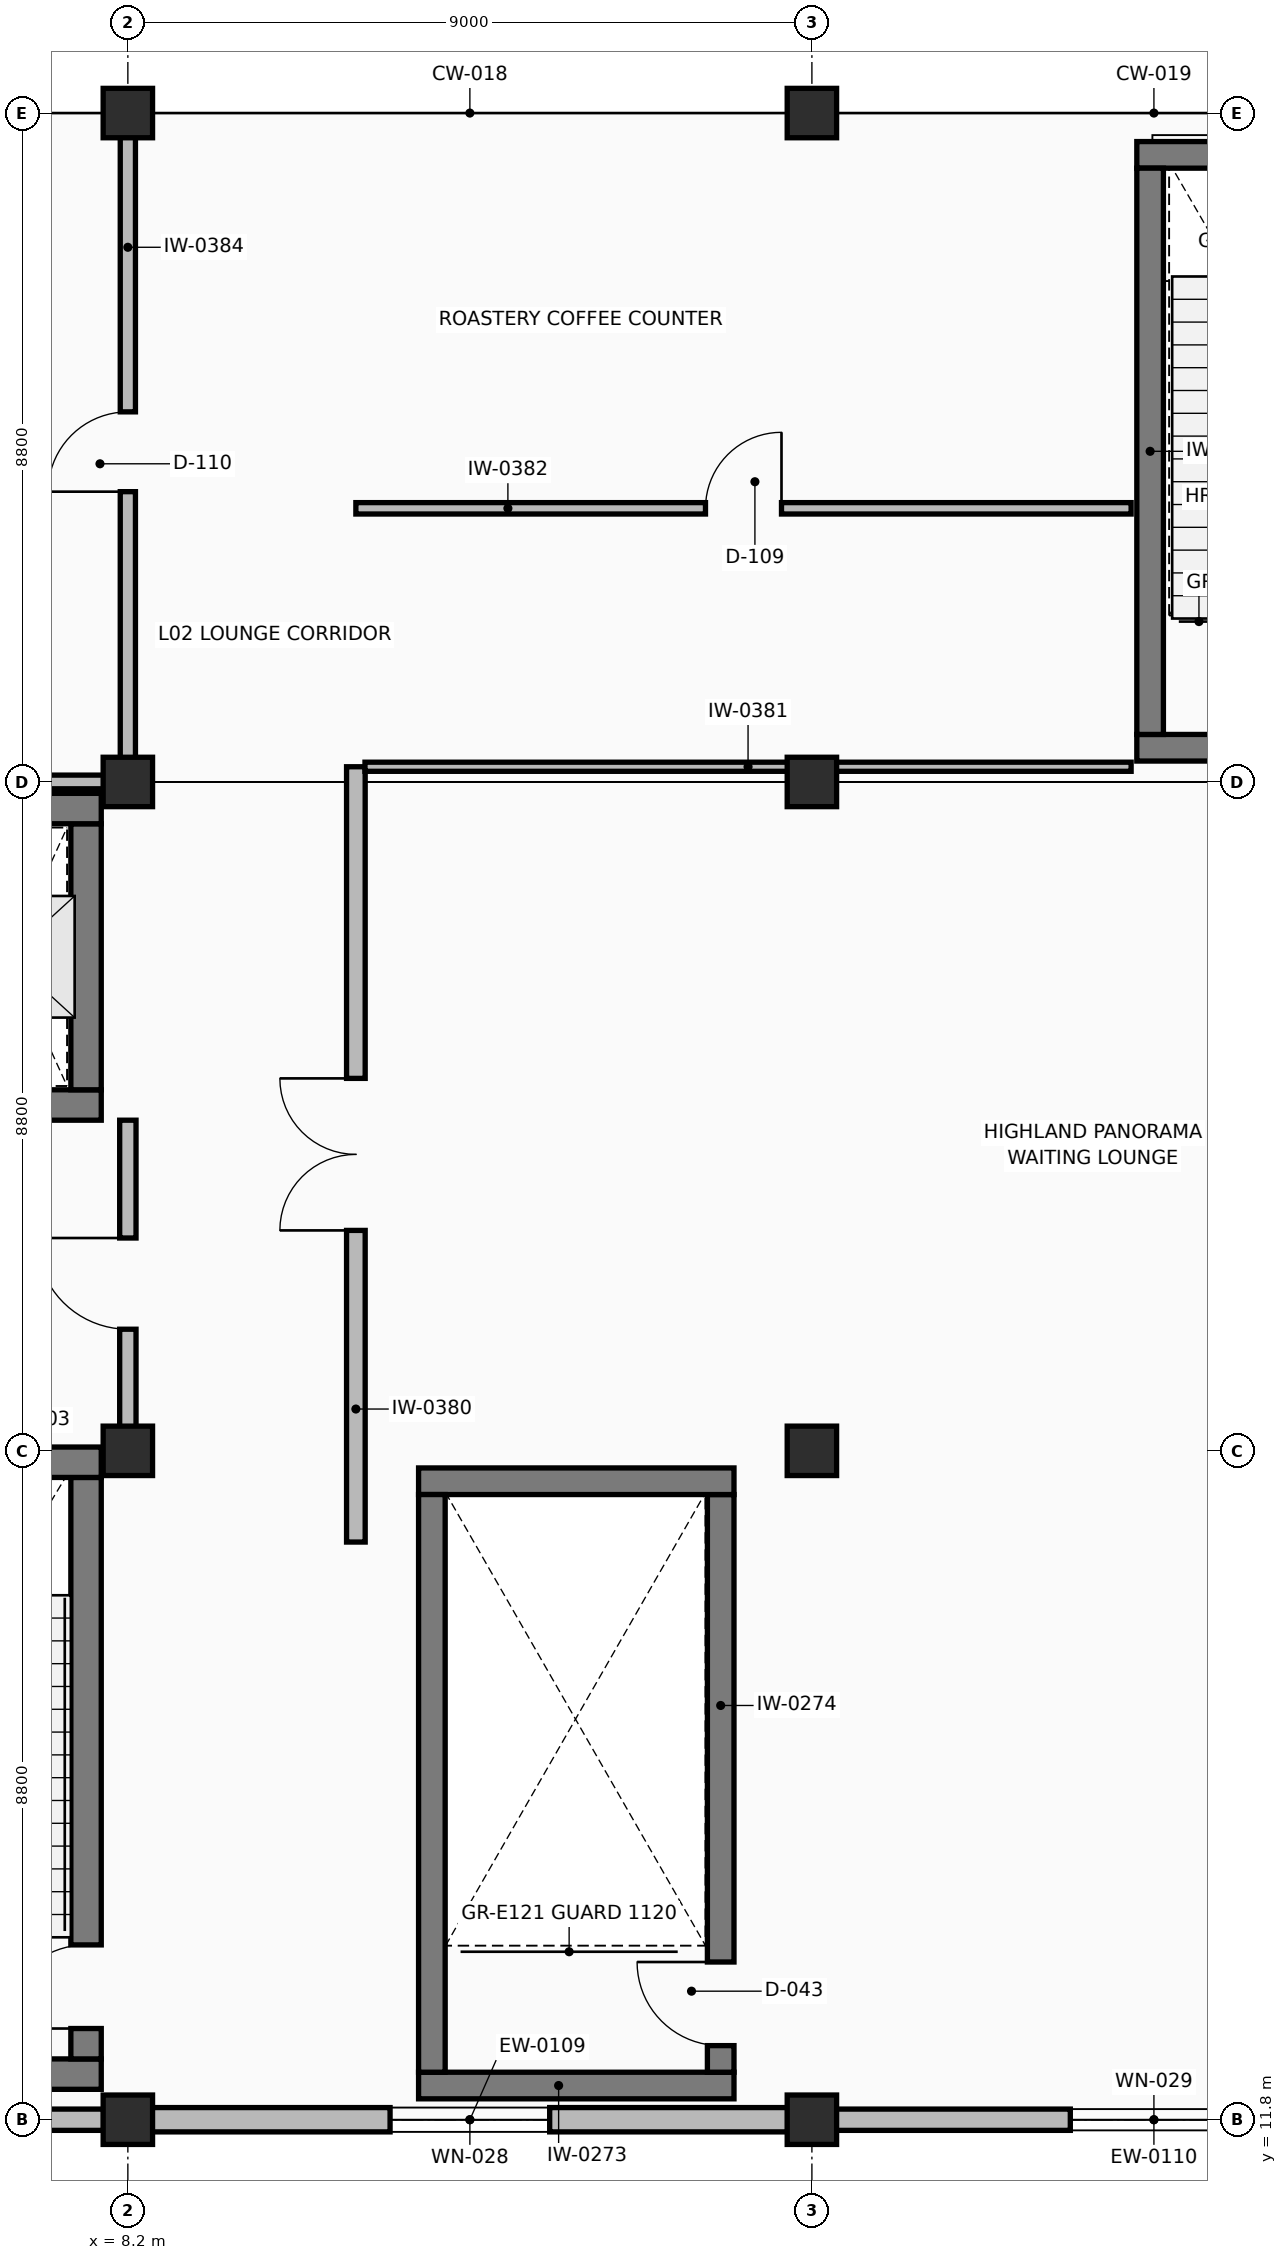
"""IFC4 building model, lengths in metres.
Left out: names, types, materials, properties, quantities, classifications, styles, units other than length and angle.
Written with IfcOpenShell. Run it as: python <this file> out.ifc"""

import sys

from ifc_helpers import new_model, si_unit, direction, frame, frame_2d, origin, origin_2d, place, context, subcontext, project, spatial, rectangle, extrude, element, fill, save


model = new_model("IFC4")
c1 = context("Model", 3, precision=1e-05, world=origin(), true_north=direction((0.0, 1.0)))
c2 = subcontext(c1, "Body", "Model", "MODEL_VIEW")
j1 = project(units=[si_unit("LENGTHUNIT", "METRE"), si_unit("PLANEANGLEUNIT", "RADIAN")], contexts=[c1])
p1 = place(None, origin())
s1 = spatial("IfcSite", under=j1, at=p1, CompositionType="ELEMENT")
p2 = place(p1, origin())
s2 = spatial("IfcBuilding", under=s1, at=p2, CompositionType="ELEMENT")
p3 = place(p2, frame((0.0, 0.0, 9.6)))
s3 = spatial("IfcBuildingStorey", under=s2, at=p3, CompositionType="ELEMENT", Elevation=9.6)
for number, where, z_axis, x_axis in (
    (1, (8.2, 11.8, 0.0), (0.0, 0.0, 1.0), (1.0, 0.0, 0.0)),
    (2, (8.2, 20.6, 0.0), (0.0, 0.0, 1.0), (1.0, 0.0, 0.0)),
    (3, (8.2, 29.4, 0.0), (0.0, 0.0, 1.0), (1.0, 0.0, 0.0)),
    (4, (8.2, 38.2, 0.0), (0.0, 0.0, 1.0), (1.0, 0.0, 0.0)),
    (5, (17.2, 11.8, 0.0), (0.0, 0.0, 1.0), (1.0, 0.0, 0.0)),
    (6, (17.2, 20.6, 0.0), (0.0, 0.0, 1.0), (1.0, 0.0, 0.0)),
    (7, (17.2, 29.4, 0.0), (0.0, 0.0, 1.0), (1.0, 0.0, 0.0)),
    (8, (17.2, 38.2, 0.0), (0.0, 0.0, 1.0), (1.0, 0.0, 0.0)),
):
    element("IfcColumn", number, at=place(p3, frame(where, z_axis=z_axis, x_axis=x_axis)), inside=s3, PredefinedType="COLUMN", context=c2, shape_type="SweptSolid", body=[
        extrude(rectangle(XDim=0.65, YDim=0.65, at=origin_2d()), origin(), (0.0, 0.0, 1.0), 4.8),
    ])
p4 = place(p3, frame((3.32, 11.8, 0.0), z_axis=(0.0, 0.0, 1.0), x_axis=(1.0, 0.0, 0.0)))
e9 = element("IfcWall", 9, at=p4, inside=s3, PredefinedType="SOLIDWALL", context=c2, shape_type="SweptSolid", body=[
    extrude(rectangle(XDim=4.56, YDim=0.28, at=frame_2d((2.28, 0.0))), origin(), (0.0, 0.0, 1.0), 3.61),
])
p5 = place(p4, frame((1.28, 0.0, 0.9)))
e10 = element("IfcOpeningElement", 10, at=p5, cuts=e9, PredefinedType="OPENING", context=c2, shape_type="SweptSolid", body=[
    extrude(rectangle(XDim=2.0, YDim=1.5, at=frame_2d((1.0, 0.75))), frame((0.0, 0.15, 0.0), z_axis=(0.0, -1.0, 0.0), x_axis=(1.0, 0.0, 0.0)), (0.0, 0.0, 1.0), 0.3),
])
p6 = place(p3, frame((8.52, 11.8, 0.0), z_axis=(0.0, 0.0, 1.0), x_axis=(1.0, 0.0, 0.0)))
e11 = element("IfcWall", 11, at=p6, inside=s3, PredefinedType="SOLIDWALL", context=c2, shape_type="SweptSolid", body=[
    extrude(rectangle(XDim=8.36, YDim=0.32, at=frame_2d((4.18, 0.0))), origin(), (0.0, 0.0, 1.0), 3.61),
])
p7 = place(p6, frame((3.13, 0.0, 0.9)))
e12 = element("IfcOpeningElement", 12, at=p7, cuts=e11, PredefinedType="OPENING", context=c2, shape_type="SweptSolid", body=[
    extrude(rectangle(XDim=2.1, YDim=1.55, at=frame_2d((1.05, 0.775))), frame((0.0, 0.17, 0.0), z_axis=(0.0, -1.0, 0.0), x_axis=(1.0, 0.0, 0.0)), (0.0, 0.0, 1.0), 0.34),
])
p8 = place(p3, frame((17.52, 11.8, 0.0), z_axis=(0.0, 0.0, 1.0), x_axis=(1.0, 0.0, 0.0)))
e13 = element("IfcWall", 13, at=p8, inside=s3, PredefinedType="SOLIDWALL", context=c2, shape_type="SweptSolid", body=[
    extrude(rectangle(XDim=8.36, YDim=0.28, at=frame_2d((4.18, 0.0))), origin(), (0.0, 0.0, 1.0), 3.61),
])
p9 = place(p8, frame((3.08, 0.0, 0.9)))
e14 = element("IfcOpeningElement", 14, at=p9, cuts=e13, PredefinedType="OPENING", context=c2, shape_type="SweptSolid", body=[
    extrude(rectangle(XDim=2.2, YDim=1.4, at=frame_2d((1.1, 0.7))), frame((0.0, 0.15, 0.0), z_axis=(0.0, -1.0, 0.0), x_axis=(1.0, 0.0, 0.0)), (0.0, 0.0, 1.0), 0.3),
])
p10 = place(p3, frame((3.45, 12.4, 0.0), z_axis=(0.0, 0.0, 1.0), x_axis=(1.0, 0.0, 0.0)))
e15 = element("IfcWall", 15, at=p10, inside=s3, PredefinedType="SHEAR", context=c2, shape_type="SweptSolid", body=[
    extrude(rectangle(XDim=4.4, YDim=0.4, at=frame_2d((2.2, 0.0))), origin(), (0.0, 0.0, 1.0), 4.49),
])
p11 = place(p3, frame((7.65, 12.6, 0.0), z_axis=(0.0, 0.0, 1.0), x_axis=(0.0, 1.0, 0.0)))
e16 = element("IfcWall", 16, at=p11, inside=s3, PredefinedType="SHEAR", context=c2, shape_type="SweptSolid", body=[
    extrude(rectangle(XDim=7.65, YDim=0.4, at=frame_2d((3.825, 0.0))), origin(), (0.0, 0.0, 1.0), 4.49),
])
p12 = place(p11, frame((0.4, 0.0, 0.0)))
e17 = element("IfcOpeningElement", 17, at=p12, cuts=e16, PredefinedType="OPENING", context=c2, shape_type="SweptSolid", body=[
    extrude(rectangle(XDim=1.1, YDim=2.2, at=frame_2d((0.55, 1.1))), frame((0.0, 0.21, 0.0), z_axis=(0.0, -1.0, 0.0), x_axis=(1.0, 0.0, 0.0)), (0.0, 0.0, 1.0), 0.42),
])
p13 = place(p3, frame((7.85, 20.45, 0.0), z_axis=(0.0, 0.0, 1.0), x_axis=(-1.0, 0.0, 0.0)))
e18 = element("IfcWall", 18, at=p13, inside=s3, PredefinedType="SHEAR", context=c2, shape_type="SweptSolid", body=[
    extrude(rectangle(XDim=4.4, YDim=0.4, at=frame_2d((2.2, 0.0))), origin(), (0.0, 0.0, 1.0), 4.49),
])
p14 = place(p3, frame((3.45, 25.15, 0.0), z_axis=(0.0, 0.0, 1.0), x_axis=(1.0, 0.0, 0.0)))
e19 = element("IfcWall", 19, at=p14, inside=s3, PredefinedType="SHEAR", context=c2, shape_type="SweptSolid", body=[
    extrude(rectangle(XDim=4.4, YDim=0.4, at=frame_2d((2.2, 0.0))), origin(), (0.0, 0.0, 1.0), 4.49),
])
p15 = place(p14, frame((1.65, 0.0, 0.0)))
e20 = element("IfcOpeningElement", 20, at=p15, cuts=e19, PredefinedType="OPENING", context=c2, shape_type="SweptSolid", body=[
    extrude(rectangle(XDim=1.1, YDim=2.2, at=frame_2d((0.55, 1.1))), frame((0.0, 0.21, 0.0), z_axis=(0.0, -1.0, 0.0), x_axis=(1.0, 0.0, 0.0)), (0.0, 0.0, 1.0), 0.42),
])
p16 = place(p3, frame((7.65, 25.35, 0.0), z_axis=(0.0, 0.0, 1.0), x_axis=(0.0, 1.0, 0.0)))
e21 = element("IfcWall", 21, at=p16, inside=s3, PredefinedType="SHEAR", context=c2, shape_type="SweptSolid", body=[
    extrude(rectangle(XDim=3.5, YDim=0.4, at=frame_2d((1.75, 0.0))), origin(), (0.0, 0.0, 1.0), 4.49),
])
p17 = place(p3, frame((7.85, 29.05, 0.0), z_axis=(0.0, 0.0, 1.0), x_axis=(-1.0, 0.0, 0.0)))
e22 = element("IfcWall", 22, at=p17, inside=s3, PredefinedType="SHEAR", context=c2, shape_type="SweptSolid", body=[
    extrude(rectangle(XDim=4.4, YDim=0.4, at=frame_2d((2.2, 0.0))), origin(), (0.0, 0.0, 1.0), 4.49),
])
p18 = place(p3, frame((21.475, 29.85, 0.0), z_axis=(0.0, 0.0, 1.0), x_axis=(1.0, 0.0, 0.0)))
e23 = element("IfcWall", 23, at=p18, inside=s3, PredefinedType="SHEAR", context=c2, shape_type="SweptSolid", body=[
    extrude(rectangle(XDim=4.25, YDim=0.35, at=frame_2d((2.125, 0.0))), origin(), (0.0, 0.0, 1.0), 4.49),
])
p19 = place(p18, frame((1.3, 0.0, 0.0)))
e24 = element("IfcOpeningElement", 24, at=p19, cuts=e23, PredefinedType="OPENING", context=c2, shape_type="SweptSolid", body=[
    extrude(rectangle(XDim=1.1, YDim=2.2, at=frame_2d((0.55, 1.1))), frame((0.0, 0.185, 0.0), z_axis=(0.0, -1.0, 0.0), x_axis=(1.0, 0.0, 0.0)), (0.0, 0.0, 1.0), 0.37),
])
p20 = place(p3, frame((25.725, 37.65, 0.0), z_axis=(0.0, 0.0, 1.0), x_axis=(-1.0, 0.0, 0.0)))
e25 = element("IfcWall", 25, at=p20, inside=s3, PredefinedType="SHEAR", context=c2, shape_type="SweptSolid", body=[
    extrude(rectangle(XDim=4.25, YDim=0.35, at=frame_2d((2.125, 0.0))), origin(), (0.0, 0.0, 1.0), 4.49),
])
p21 = place(p3, frame((21.65, 37.475, 0.0), z_axis=(0.0, 0.0, 1.0), x_axis=(0.0, -1.0, 0.0)))
e26 = element("IfcWall", 26, at=p21, inside=s3, PredefinedType="SHEAR", context=c2, shape_type="SweptSolid", body=[
    extrude(rectangle(XDim=7.45, YDim=0.35, at=frame_2d((3.725, 0.0))), origin(), (0.0, 0.0, 1.0), 4.49),
])
p22 = place(p3, frame((12.025, 12.25, 0.0), z_axis=(0.0, 0.0, 1.0), x_axis=(1.0, 0.0, 0.0)))
e27 = element("IfcWall", 27, at=p22, inside=s3, PredefinedType="SHEAR", context=c2, shape_type="SweptSolid", body=[
    extrude(rectangle(XDim=4.15, YDim=0.35, at=frame_2d((2.075, 0.0))), origin(), (0.0, 0.0, 1.0), 4.49),
])
p23 = place(p3, frame((16.0, 12.425, 0.0), z_axis=(0.0, 0.0, 1.0), x_axis=(0.0, 1.0, 0.0)))
e28 = element("IfcWall", 28, at=p23, inside=s3, PredefinedType="SHEAR", context=c2, shape_type="SweptSolid", body=[
    extrude(rectangle(XDim=7.6, YDim=0.35, at=frame_2d((3.8, 0.0))), origin(), (0.0, 0.0, 1.0), 4.49),
])
p24 = place(p23, frame((0.35, 0.0, 0.0)))
e29 = element("IfcOpeningElement", 29, at=p24, cuts=e28, PredefinedType="OPENING", context=c2, shape_type="SweptSolid", body=[
    extrude(rectangle(XDim=1.1, YDim=2.2, at=frame_2d((0.55, 1.1))), frame((0.0, 0.185, 0.0), z_axis=(0.0, -1.0, 0.0), x_axis=(1.0, 0.0, 0.0)), (0.0, 0.0, 1.0), 0.37),
])
p25 = place(p3, frame((16.175, 20.2, 0.0), z_axis=(0.0, 0.0, 1.0), x_axis=(-1.0, 0.0, 0.0)))
e30 = element("IfcWall", 30, at=p25, inside=s3, PredefinedType="SHEAR", context=c2, shape_type="SweptSolid", body=[
    extrude(rectangle(XDim=4.15, YDim=0.35, at=frame_2d((2.075, 0.0))), origin(), (0.0, 0.0, 1.0), 4.49),
])
p26 = place(p3, frame((12.2, 20.025, 0.0), z_axis=(0.0, 0.0, 1.0), x_axis=(0.0, -1.0, 0.0)))
e31 = element("IfcWall", 31, at=p26, inside=s3, PredefinedType="SHEAR", context=c2, shape_type="SweptSolid", body=[
    extrude(rectangle(XDim=7.6, YDim=0.35, at=frame_2d((3.8, 0.0))), origin(), (0.0, 0.0, 1.0), 4.49),
])
p27 = place(p3, frame((8.2, 20.65, 0.0), z_axis=(0.0, 0.0, 1.0), x_axis=(0.0, 1.0, 0.0)))
e32 = element("IfcWall", 32, at=p27, inside=s3, PredefinedType="PARTITIONING", context=c2, shape_type="SweptSolid", body=[
    extrude(rectangle(XDim=4.3, YDim=0.215, at=frame_2d((2.15, 0.0))), origin(), (0.0, 0.0, 1.0), 3.6),
])
p28 = place(p27, frame((1.55, 0.0, 0.0)))
e33 = element("IfcOpeningElement", 33, at=p28, cuts=e32, PredefinedType="OPENING", context=c2, shape_type="SweptSolid", body=[
    extrude(rectangle(XDim=1.2, YDim=2.2, at=frame_2d((0.6, 1.1))), frame((0.0, 0.117, 0.0), z_axis=(0.0, -1.0, 0.0), x_axis=(1.0, 0.0, 0.0)), (0.0, 0.0, 1.0), 0.235),
])
p29 = place(p3, frame((11.2, 19.4, 0.0), z_axis=(0.0, 0.0, 1.0), x_axis=(0.0, 1.0, 0.0)))
e34 = element("IfcWall", 34, at=p29, inside=s3, PredefinedType="PARTITIONING", context=c2, shape_type="SweptSolid", body=[
    extrude(rectangle(XDim=10.2, YDim=0.245, at=frame_2d((5.1, 0.0))), origin(), (0.0, 0.0, 1.0), 3.6),
])
p30 = place(p29, frame((4.1, 0.0, 0.0)))
e35 = element("IfcOpeningElement", 35, at=p30, cuts=e34, PredefinedType="OPENING", context=c2, shape_type="SweptSolid", body=[
    extrude(rectangle(XDim=2.0, YDim=2.4, at=frame_2d((1.0, 1.2))), frame((0.0, 0.133, 0.0), z_axis=(0.0, -1.0, 0.0), x_axis=(1.0, 0.0, 0.0)), (0.0, 0.0, 1.0), 0.265),
])
p31 = place(p3, frame((11.32, 29.6, 0.0), z_axis=(0.0, 0.0, 1.0), x_axis=(1.0, 0.0, 0.0)))
e36 = element("IfcWall", 36, at=p31, inside=s3, PredefinedType="PARTITIONING", context=c2, shape_type="SweptSolid", body=[
    extrude(rectangle(XDim=10.08, YDim=0.12, at=frame_2d((5.04, 0.0))), origin(), (0.0, 0.0, 1.0), 3.6),
])
p32 = place(p3, frame((11.2, 33.0, 0.0), z_axis=(0.0, 0.0, 1.0), x_axis=(1.0, 0.0, 0.0)))
e37 = element("IfcWall", 37, at=p32, inside=s3, PredefinedType="PARTITIONING", context=c2, shape_type="SweptSolid", body=[
    extrude(rectangle(XDim=10.2, YDim=0.15, at=frame_2d((5.1, 0.0))), origin(), (0.0, 0.0, 1.0), 3.6),
])
p33 = place(p32, frame((4.6, 0.0, 0.0)))
e38 = element("IfcOpeningElement", 38, at=p33, cuts=e37, PredefinedType="OPENING", context=c2, shape_type="SweptSolid", body=[
    extrude(rectangle(XDim=1.0, YDim=2.15, at=frame_2d((0.5, 1.075))), frame((0.0, 0.085, 0.0), z_axis=(0.0, -1.0, 0.0), x_axis=(1.0, 0.0, 0.0)), (0.0, 0.0, 1.0), 0.17),
])
p34 = place(p3, frame((3.2, 29.4, 0.0), z_axis=(0.0, 0.0, 1.0), x_axis=(1.0, 0.0, 0.0)))
e39 = element("IfcWall", 39, at=p34, inside=s3, PredefinedType="STANDARD", context=c2, shape_type="SweptSolid", body=[
    extrude(rectangle(XDim=5.0, YDim=0.18, at=frame_2d((2.5, 0.0))), origin(), (0.0, 0.0, 1.0), 3.6),
])
p35 = place(p3, frame((8.2, 29.488, 0.0), z_axis=(0.0, 0.0, 1.0), x_axis=(0.0, 1.0, 0.0)))
e40 = element("IfcWall", 40, at=p35, inside=s3, PredefinedType="PARTITIONING", context=c2, shape_type="SweptSolid", body=[
    extrude(rectangle(XDim=8.512, YDim=0.2, at=frame_2d((4.256, 0.0))), origin(), (0.0, 0.0, 1.0), 3.6),
])
p36 = place(p35, frame((3.731, 0.0, 0.0)))
e41 = element("IfcOpeningElement", 41, at=p36, cuts=e40, PredefinedType="OPENING", context=c2, shape_type="SweptSolid", body=[
    extrude(rectangle(XDim=1.05, YDim=2.15, at=frame_2d((0.525, 1.075))), frame((0.0, 0.11, 0.0), z_axis=(0.0, -1.0, 0.0), x_axis=(1.0, 0.0, 0.0)), (0.0, 0.0, 1.0), 0.22),
])
p37 = place(p7, origin())
e42 = element("IfcWindow", 42, at=p37, inside=s3, PartitioningType="SINGLE_PANEL", PredefinedType="WINDOW", context=c2, shape_type="SweptSolid", body=[
    extrude(rectangle(XDim=2.1, YDim=1.55, at=frame_2d((1.05, 0.775))), frame((0.0, 0.03, 0.0), z_axis=(0.0, -1.0, 0.0), x_axis=(1.0, 0.0, 0.0)), (0.0, 0.0, 1.0), 0.06),
])
fill(e12, e42)
p38 = place(p9, origin())
e43 = element("IfcWindow", 43, at=p38, inside=s3, PartitioningType="SINGLE_PANEL", PredefinedType="WINDOW", context=c2, shape_type="SweptSolid", body=[
    extrude(rectangle(XDim=2.2, YDim=1.4, at=frame_2d((1.1, 0.7))), frame((0.0, 0.03, 0.0), z_axis=(0.0, -1.0, 0.0), x_axis=(1.0, 0.0, 0.0)), (0.0, 0.0, 1.0), 0.06),
])
fill(e14, e43)
p39 = place(p12, origin())
e44 = element("IfcDoor", 44, at=p39, inside=s3, OperationType="SINGLE_SWING_LEFT", PredefinedType="DOOR", context=c2, shape_type="SweptSolid", body=[
    extrude(rectangle(XDim=1.1, YDim=2.2, at=frame_2d((0.55, 1.1))), frame((0.0, 0.025, 0.0), z_axis=(0.0, -1.0, 0.0), x_axis=(1.0, 0.0, 0.0)), (0.0, 0.0, 1.0), 0.05),
])
fill(e17, e44)
p40 = place(p24, origin())
e45 = element("IfcDoor", 45, at=p40, inside=s3, OperationType="SINGLE_SWING_RIGHT", PredefinedType="DOOR", context=c2, shape_type="SweptSolid", body=[
    extrude(rectangle(XDim=1.1, YDim=2.2, at=frame_2d((0.55, 1.1))), frame((0.0, 0.025, 0.0), z_axis=(0.0, -1.0, 0.0), x_axis=(1.0, 0.0, 0.0)), (0.0, 0.0, 1.0), 0.05),
])
fill(e29, e45)
p41 = place(p28, origin())
e46 = element("IfcDoor", 46, at=p41, inside=s3, OperationType="SINGLE_SWING_RIGHT", PredefinedType="DOOR", context=c2, shape_type="SweptSolid", body=[
    extrude(rectangle(XDim=1.2, YDim=2.2, at=frame_2d((0.6, 1.1))), frame((0.0, 0.025, 0.0), z_axis=(0.0, -1.0, 0.0), x_axis=(1.0, 0.0, 0.0)), (0.0, 0.0, 1.0), 0.05),
])
fill(e33, e46)
p42 = place(p30, origin())
e47 = element("IfcDoor", 47, at=p42, inside=s3, OperationType="DOUBLE_DOOR_SINGLE_SWING", PredefinedType="DOOR", context=c2, shape_type="SweptSolid", body=[
    extrude(rectangle(XDim=2.0, YDim=2.4, at=frame_2d((1.0, 1.2))), frame((0.0, 0.025, 0.0), z_axis=(0.0, -1.0, 0.0), x_axis=(1.0, 0.0, 0.0)), (0.0, 0.0, 1.0), 0.05),
])
fill(e35, e47)
p43 = place(p33, origin())
e48 = element("IfcDoor", 48, at=p43, inside=s3, OperationType="SINGLE_SWING_RIGHT", PredefinedType="DOOR", context=c2, shape_type="SweptSolid", body=[
    extrude(rectangle(XDim=1.0, YDim=2.15, at=frame_2d((0.5, 1.075))), frame((0.0, 0.025, 0.0), z_axis=(0.0, -1.0, 0.0), x_axis=(1.0, 0.0, 0.0)), (0.0, 0.0, 1.0), 0.05),
])
fill(e38, e48)
p44 = place(p36, origin())
e49 = element("IfcDoor", 49, at=p44, inside=s3, OperationType="SINGLE_SWING_LEFT", PredefinedType="DOOR", context=c2, shape_type="SweptSolid", body=[
    extrude(rectangle(XDim=1.05, YDim=2.15, at=frame_2d((0.525, 1.075))), frame((0.0, 0.025, 0.0), z_axis=(0.0, -1.0, 0.0), x_axis=(1.0, 0.0, 0.0)), (0.0, 0.0, 1.0), 0.05),
])
fill(e41, e49)
save(model, sys.argv[1])
